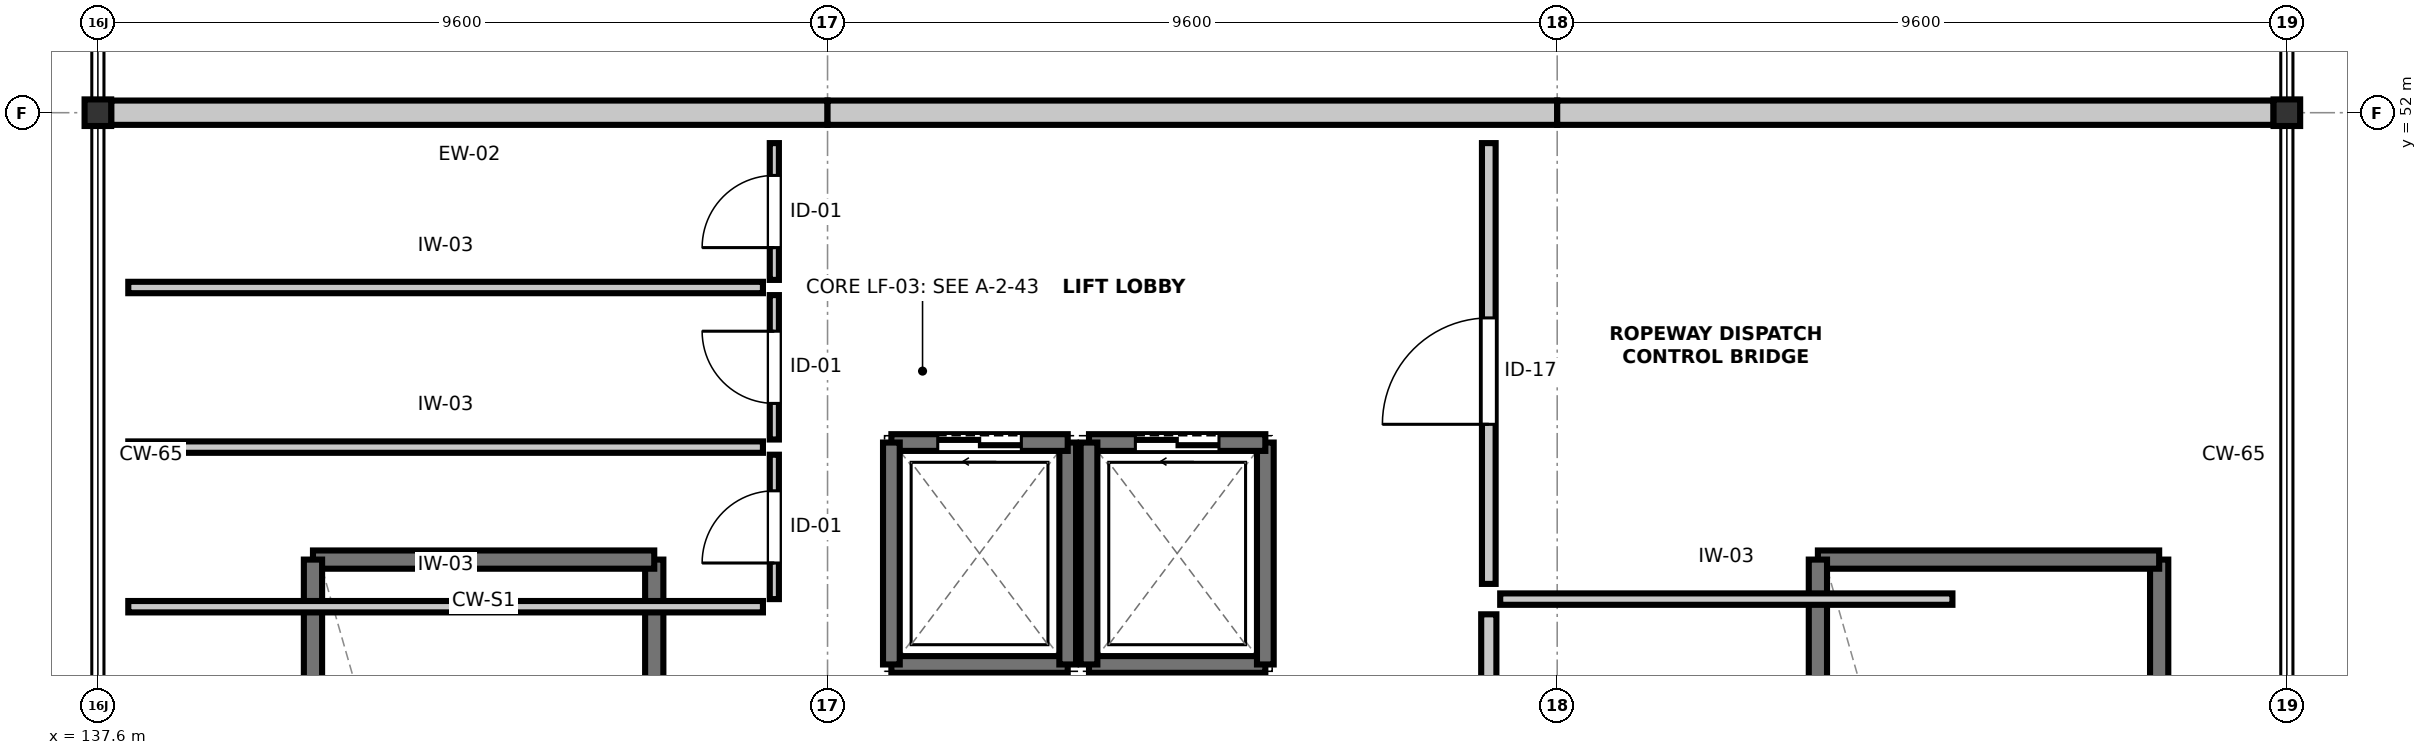
"""IFC4 building model, lengths in metres.
Left out: names, types, materials, properties, quantities, classifications, styles, units other than length and angle.
Written with IfcOpenShell. Run it as: python <this file> out.ifc"""

import sys

from ifc_helpers import new_model, si_unit, direction, frame, frame_2d, origin, origin_2d, place, context, subcontext, project, spatial, rectangle, i_section, extrude, element, fill, save


model = new_model("IFC4")
c1 = context("Model", 3, precision=1e-05, world=origin(), true_north=direction((0.0, 1.0)))
c2 = subcontext(c1, "Body", "Model", "MODEL_VIEW")
j1 = project(units=[si_unit("LENGTHUNIT", "METRE"), si_unit("PLANEANGLEUNIT", "RADIAN")], contexts=[c1])
p1 = place(None, origin())
s1 = spatial("IfcSite", under=j1, at=p1, CompositionType="ELEMENT")
p2 = place(p1, origin())
s2 = spatial("IfcBuilding", under=s1, at=p2, CompositionType="ELEMENT")
p3 = place(p2, frame((0.0, 0.0, 24.6)))
s3 = spatial("IfcBuildingStorey", under=s2, at=p3, CompositionType="ELEMENT", Elevation=24.6)
for number, where, z_axis, x_axis in (
    (1, (137.6, 52.0, 0.0), (0.0, 0.0, 1.0), (1.0, 0.0, 0.0)),
    (2, (166.4, 52.0, 0.0), (0.0, 0.0, 1.0), (1.0, 0.0, 0.0)),
):
    element("IfcColumn", number, at=place(p3, frame(where, z_axis=z_axis, x_axis=x_axis)), inside=s3, PredefinedType="COLUMN", context=c2, shape_type="SweptSolid", body=[
        extrude(i_section(OverallWidth=0.35, OverallDepth=0.35, WebThickness=0.012, FlangeThickness=0.019, FilletRadius=0.02, at=origin_2d()), origin(), (0.0, 0.0, 1.0), 3.282),
    ])
p4 = place(p3, frame((147.2, 52.0, 0.0), z_axis=(0.0, 0.0, 1.0), x_axis=(-1.0, 0.0, 0.0)))
e3 = element("IfcWall", 3, at=p4, inside=s3, PredefinedType="STANDARD", context=c2, shape_type="SweptSolid", body=[
    extrude(rectangle(XDim=9.425, YDim=0.32, at=frame_2d((4.712, 0.0))), origin(), (0.0, 0.0, 1.0), 2.35),
])
p5 = place(p3, frame((156.8, 52.0, 0.0), z_axis=(0.0, 0.0, 1.0), x_axis=(-1.0, 0.0, 0.0)))
e4 = element("IfcWall", 4, at=p5, inside=s3, PredefinedType="STANDARD", context=c2, shape_type="SweptSolid", body=[
    extrude(rectangle(XDim=9.6, YDim=0.32, at=frame_2d((4.8, 0.0))), origin(), (0.0, 0.0, 1.0), 2.35),
])
p6 = place(p3, frame((166.225, 52.0, 0.0), z_axis=(0.0, 0.0, 1.0), x_axis=(-1.0, 0.0, 0.0)))
e5 = element("IfcWall", 5, at=p6, inside=s3, PredefinedType="STANDARD", context=c2, shape_type="SweptSolid", body=[
    extrude(rectangle(XDim=9.425, YDim=0.32, at=frame_2d((4.712, 0.0))), origin(), (0.0, 0.0, 1.0), 2.35),
])
p7 = place(p3, frame((144.92, 36.68, 0.0), z_axis=(0.0, 0.0, 1.0), x_axis=(0.0, 1.0, 0.0)))
e6 = element("IfcWall", 6, at=p7, inside=s3, PredefinedType="SHEAR", context=c2, shape_type="SweptSolid", body=[
    extrude(rectangle(XDim=9.44, YDim=0.24, at=frame_2d((4.72, 0.0))), origin(), (0.0, 0.0, 1.0), 2.35),
])
p8 = place(p3, frame((144.92, 46.12, 0.0), z_axis=(0.0, 0.0, 1.0), x_axis=(-1.0, 0.0, 0.0)))
e7 = element("IfcWall", 7, at=p8, inside=s3, PredefinedType="SHEAR", context=c2, shape_type="SweptSolid", body=[
    extrude(rectangle(XDim=4.49, YDim=0.24, at=frame_2d((2.245, 0.0))), origin(), (0.0, 0.0, 1.0), 2.35),
])
for number, where, z_axis, x_axis in (
    (8, (140.43, 46.12, 0.0), (0.0, 0.0, 1.0), (0.0, -1.0, 0.0)),
    (9, (164.72, 36.68, 0.0), (0.0, 0.0, 1.0), (0.0, 1.0, 0.0)),
):
    element("IfcWall", number, at=place(p3, frame(where, z_axis=z_axis, x_axis=x_axis)), inside=s3, PredefinedType="SHEAR", context=c2, shape_type="SweptSolid", body=[
        extrude(rectangle(XDim=9.44, YDim=0.24, at=frame_2d((4.72, 0.0))), origin(), (0.0, 0.0, 1.0), 2.35),
    ])
p9 = place(p3, frame((164.72, 46.12, 0.0), z_axis=(0.0, 0.0, 1.0), x_axis=(-1.0, 0.0, 0.0)))
e10 = element("IfcWall", 10, at=p9, inside=s3, PredefinedType="SHEAR", context=c2, shape_type="SweptSolid", body=[
    extrude(rectangle(XDim=4.49, YDim=0.24, at=frame_2d((2.245, 0.0))), origin(), (0.0, 0.0, 1.0), 2.35),
])
p10 = place(p3, frame((160.23, 46.12, 0.0), z_axis=(0.0, 0.0, 1.0), x_axis=(0.0, -1.0, 0.0)))
e11 = element("IfcWall", 11, at=p10, inside=s3, PredefinedType="SHEAR", context=c2, shape_type="SweptSolid", body=[
    extrude(rectangle(XDim=9.44, YDim=0.24, at=frame_2d((4.72, 0.0))), origin(), (0.0, 0.0, 1.0), 2.35),
])
p11 = place(p3, frame((148.04, 44.74, 0.0), z_axis=(0.0, 0.0, 1.0), x_axis=(1.0, 0.0, 0.0)))
e12 = element("IfcWall", 12, at=p11, inside=s3, PredefinedType="SHEAR", context=c2, shape_type="SweptSolid", body=[
    extrude(rectangle(XDim=2.32, YDim=0.22, at=frame_2d((1.16, 0.0))), origin(), (0.0, 0.0, 1.0), 4.3),
])
p12 = place(p3, frame((150.36, 44.74, 0.0), z_axis=(0.0, 0.0, 1.0), x_axis=(0.0, 1.0, 0.0)))
e13 = element("IfcWall", 13, at=p12, inside=s3, PredefinedType="SHEAR", context=c2, shape_type="SweptSolid", body=[
    extrude(rectangle(XDim=2.92, YDim=0.22, at=frame_2d((1.46, 0.0))), origin(), (0.0, 0.0, 1.0), 4.3),
])
p13 = place(p3, frame((150.36, 47.66, 0.0), z_axis=(0.0, 0.0, 1.0), x_axis=(-1.0, 0.0, 0.0)))
e14 = element("IfcWall", 14, at=p13, inside=s3, PredefinedType="SHEAR", context=c2, shape_type="SweptSolid", body=[
    extrude(rectangle(XDim=2.32, YDim=0.22, at=frame_2d((1.16, 0.0))), origin(), (0.0, 0.0, 1.0), 4.3),
])
p14 = place(p13, frame((0.61, 0.0, 0.0)))
e15 = element("IfcOpeningElement", 15, at=p14, cuts=e14, PredefinedType="OPENING", context=c2, shape_type="SweptSolid", body=[
    extrude(rectangle(XDim=1.1, YDim=2.15, at=frame_2d((0.55, 1.075))), frame((0.0, 0.12, 0.0), z_axis=(0.0, -1.0, 0.0), x_axis=(1.0, 0.0, 0.0)), (0.0, 0.0, 1.0), 0.24),
])
p15 = place(p3, frame((148.04, 47.66, 0.0), z_axis=(0.0, 0.0, 1.0), x_axis=(0.0, -1.0, 0.0)))
e16 = element("IfcWall", 16, at=p15, inside=s3, PredefinedType="SHEAR", context=c2, shape_type="SweptSolid", body=[
    extrude(rectangle(XDim=2.92, YDim=0.22, at=frame_2d((1.46, 0.0))), origin(), (0.0, 0.0, 1.0), 4.3),
])
p16 = place(p3, frame((150.64, 44.74, 0.0), z_axis=(0.0, 0.0, 1.0), x_axis=(1.0, 0.0, 0.0)))
e17 = element("IfcWall", 17, at=p16, inside=s3, PredefinedType="SHEAR", context=c2, shape_type="SweptSolid", body=[
    extrude(rectangle(XDim=2.32, YDim=0.22, at=frame_2d((1.16, 0.0))), origin(), (0.0, 0.0, 1.0), 4.3),
])
p17 = place(p3, frame((152.96, 44.74, 0.0), z_axis=(0.0, 0.0, 1.0), x_axis=(0.0, 1.0, 0.0)))
e18 = element("IfcWall", 18, at=p17, inside=s3, PredefinedType="SHEAR", context=c2, shape_type="SweptSolid", body=[
    extrude(rectangle(XDim=2.92, YDim=0.22, at=frame_2d((1.46, 0.0))), origin(), (0.0, 0.0, 1.0), 4.3),
])
p18 = place(p3, frame((152.96, 47.66, 0.0), z_axis=(0.0, 0.0, 1.0), x_axis=(-1.0, 0.0, 0.0)))
e19 = element("IfcWall", 19, at=p18, inside=s3, PredefinedType="SHEAR", context=c2, shape_type="SweptSolid", body=[
    extrude(rectangle(XDim=2.32, YDim=0.22, at=frame_2d((1.16, 0.0))), origin(), (0.0, 0.0, 1.0), 4.3),
])
p19 = place(p18, frame((0.61, 0.0, 0.0)))
e20 = element("IfcOpeningElement", 20, at=p19, cuts=e19, PredefinedType="OPENING", context=c2, shape_type="SweptSolid", body=[
    extrude(rectangle(XDim=1.1, YDim=2.15, at=frame_2d((0.55, 1.075))), frame((0.0, 0.12, 0.0), z_axis=(0.0, -1.0, 0.0), x_axis=(1.0, 0.0, 0.0)), (0.0, 0.0, 1.0), 0.24),
])
p20 = place(p3, frame((150.64, 47.66, 0.0), z_axis=(0.0, 0.0, 1.0), x_axis=(0.0, -1.0, 0.0)))
e21 = element("IfcWall", 21, at=p20, inside=s3, PredefinedType="SHEAR", context=c2, shape_type="SweptSolid", body=[
    extrude(rectangle(XDim=2.92, YDim=0.22, at=frame_2d((1.46, 0.0))), origin(), (0.0, 0.0, 1.0), 4.3),
])
p21 = place(p3, frame((155.9, 45.8, 0.0), z_axis=(0.0, 0.0, 1.0), x_axis=(0.0, 1.0, 0.0)))
e22 = element("IfcWall", 22, at=p21, inside=s3, PredefinedType="PARTITIONING", context=c2, shape_type="SweptSolid", body=[
    extrude(rectangle(XDim=5.8, YDim=0.18, at=frame_2d((2.9, 0.0))), origin(), (0.0, 0.0, 1.0), 4.0),
])
p22 = place(p21, frame((2.1, 0.0, 0.0)))
e23 = element("IfcOpeningElement", 23, at=p22, cuts=e22, PredefinedType="OPENING", context=c2, shape_type="SweptSolid", body=[
    extrude(rectangle(XDim=1.4, YDim=2.22, at=frame_2d((0.7, 1.11))), frame((0.0, 0.1, 0.0), z_axis=(0.0, -1.0, 0.0), x_axis=(1.0, 0.0, 0.0)), (0.0, 0.0, 1.0), 0.2),
])
p23 = place(p3, frame((155.9, 36.8, 0.0), z_axis=(0.0, 0.0, 1.0), x_axis=(0.0, 1.0, 0.0)))
e24 = element("IfcWall", 24, at=p23, inside=s3, PredefinedType="PARTITIONING", context=c2, shape_type="SweptSolid", body=[
    extrude(rectangle(XDim=8.6, YDim=0.2, at=frame_2d((4.3, 0.0))), origin(), (0.0, 0.0, 1.0), 4.0),
])
p24 = place(p23, frame((3.425, 0.0, 0.0)))
e25 = element("IfcOpeningElement", 25, at=p24, cuts=e24, PredefinedType="OPENING", context=c2, shape_type="SweptSolid", body=[
    extrude(rectangle(XDim=1.15, YDim=2.16, at=frame_2d((0.575, 1.08))), frame((0.0, 0.11, 0.0), z_axis=(0.0, -1.0, 0.0), x_axis=(1.0, 0.0, 0.0)), (0.0, 0.0, 1.0), 0.22),
])
p25 = place(p3, frame((156.05, 45.6, 0.0), z_axis=(0.0, 0.0, 1.0), x_axis=(1.0, 0.0, 0.0)))
e26 = element("IfcWall", 26, at=p25, inside=s3, PredefinedType="PARTITIONING", context=c2, shape_type="SweptSolid", body=[
    extrude(rectangle(XDim=5.95, YDim=0.15, at=frame_2d((2.975, 0.0))), origin(), (0.0, 0.0, 1.0), 4.0),
])
p26 = place(p3, frame((146.5, 45.6, 0.0), z_axis=(0.0, 0.0, 1.0), x_axis=(0.0, 1.0, 0.0)))
e27 = element("IfcWall", 27, at=p26, inside=s3, PredefinedType="PARTITIONING", context=c2, shape_type="SweptSolid", body=[
    extrude(rectangle(XDim=1.9, YDim=0.12, at=frame_2d((0.95, 0.0))), origin(), (0.0, 0.0, 1.0), 4.0),
])
p27 = place(p26, frame((0.475, 0.0, 0.0)))
e28 = element("IfcOpeningElement", 28, at=p27, cuts=e27, PredefinedType="OPENING", context=c2, shape_type="SweptSolid", body=[
    extrude(rectangle(XDim=0.95, YDim=2.12, at=frame_2d((0.475, 1.06))), frame((0.0, 0.07, 0.0), z_axis=(0.0, -1.0, 0.0), x_axis=(1.0, 0.0, 0.0)), (0.0, 0.0, 1.0), 0.14),
])
p28 = place(p3, frame((138.0, 45.5, 0.0), z_axis=(0.0, 0.0, 1.0), x_axis=(1.0, 0.0, 0.0)))
e29 = element("IfcWall", 29, at=p28, inside=s3, PredefinedType="PARTITIONING", context=c2, shape_type="SweptSolid", body=[
    extrude(rectangle(XDim=8.35, YDim=0.15, at=frame_2d((4.175, 0.0))), origin(), (0.0, 0.0, 1.0), 4.0),
])
p29 = place(p3, frame((146.5, 47.7, 0.0), z_axis=(0.0, 0.0, 1.0), x_axis=(0.0, 1.0, 0.0)))
e30 = element("IfcWall", 30, at=p29, inside=s3, PredefinedType="PARTITIONING", context=c2, shape_type="SweptSolid", body=[
    extrude(rectangle(XDim=1.9, YDim=0.12, at=frame_2d((0.95, 0.0))), origin(), (0.0, 0.0, 1.0), 4.0),
])
p30 = place(p29, frame((0.475, 0.0, 0.0)))
e31 = element("IfcOpeningElement", 31, at=p30, cuts=e30, PredefinedType="OPENING", context=c2, shape_type="SweptSolid", body=[
    extrude(rectangle(XDim=0.95, YDim=2.12, at=frame_2d((0.475, 1.06))), frame((0.0, 0.07, 0.0), z_axis=(0.0, -1.0, 0.0), x_axis=(1.0, 0.0, 0.0)), (0.0, 0.0, 1.0), 0.14),
])
p31 = place(p3, frame((138.0, 47.6, 0.0), z_axis=(0.0, 0.0, 1.0), x_axis=(1.0, 0.0, 0.0)))
e32 = element("IfcWall", 32, at=p31, inside=s3, PredefinedType="PARTITIONING", context=c2, shape_type="SweptSolid", body=[
    extrude(rectangle(XDim=8.35, YDim=0.15, at=frame_2d((4.175, 0.0))), origin(), (0.0, 0.0, 1.0), 4.0),
])
p32 = place(p3, frame((146.5, 49.8, 0.0), z_axis=(0.0, 0.0, 1.0), x_axis=(0.0, 1.0, 0.0)))
e33 = element("IfcWall", 33, at=p32, inside=s3, PredefinedType="PARTITIONING", context=c2, shape_type="SweptSolid", body=[
    extrude(rectangle(XDim=1.8, YDim=0.12, at=frame_2d((0.9, 0.0))), origin(), (0.0, 0.0, 1.0), 4.0),
])
p33 = place(p32, frame((0.425, 0.0, 0.0)))
e34 = element("IfcOpeningElement", 34, at=p33, cuts=e33, PredefinedType="OPENING", context=c2, shape_type="SweptSolid", body=[
    extrude(rectangle(XDim=0.95, YDim=2.12, at=frame_2d((0.475, 1.06))), frame((0.0, 0.07, 0.0), z_axis=(0.0, -1.0, 0.0), x_axis=(1.0, 0.0, 0.0)), (0.0, 0.0, 1.0), 0.14),
])
p34 = place(p3, frame((138.0, 49.7, 0.0), z_axis=(0.0, 0.0, 1.0), x_axis=(1.0, 0.0, 0.0)))
e35 = element("IfcWall", 35, at=p34, inside=s3, PredefinedType="PARTITIONING", context=c2, shape_type="SweptSolid", body=[
    extrude(rectangle(XDim=8.35, YDim=0.15, at=frame_2d((4.175, 0.0))), origin(), (0.0, 0.0, 1.0), 4.0),
])
p35 = place(p14, origin())
e36 = element("IfcDoor", 36, at=p35, inside=s3, OperationType="DOUBLE_DOOR_SLIDING", PredefinedType="DOOR", context=c2, shape_type="SweptSolid", body=[
    extrude(rectangle(XDim=1.1, YDim=2.15, at=frame_2d((0.55, 1.075))), frame((0.0, 0.025, 0.0), z_axis=(0.0, -1.0, 0.0), x_axis=(1.0, 0.0, 0.0)), (0.0, 0.0, 1.0), 0.05),
])
fill(e15, e36)
p36 = place(p19, origin())
e37 = element("IfcDoor", 37, at=p36, inside=s3, OperationType="DOUBLE_DOOR_SLIDING", PredefinedType="DOOR", context=c2, shape_type="SweptSolid", body=[
    extrude(rectangle(XDim=1.1, YDim=2.15, at=frame_2d((0.55, 1.075))), frame((0.0, 0.025, 0.0), z_axis=(0.0, -1.0, 0.0), x_axis=(1.0, 0.0, 0.0)), (0.0, 0.0, 1.0), 0.05),
])
fill(e20, e37)
p37 = place(p22, origin())
e38 = element("IfcDoor", 38, at=p37, inside=s3, OperationType="SINGLE_SWING_LEFT", PredefinedType="DOOR", context=c2, shape_type="SweptSolid", body=[
    extrude(rectangle(XDim=1.4, YDim=2.22, at=frame_2d((0.7, 1.11))), frame((0.0, 0.025, 0.0), z_axis=(0.0, -1.0, 0.0), x_axis=(1.0, 0.0, 0.0)), (0.0, 0.0, 1.0), 0.05),
])
fill(e23, e38)
p38 = place(p27, origin())
e39 = element("IfcDoor", 39, at=p38, inside=s3, OperationType="SINGLE_SWING_LEFT", PredefinedType="DOOR", context=c2, shape_type="SweptSolid", body=[
    extrude(rectangle(XDim=0.95, YDim=2.12, at=frame_2d((0.475, 1.06))), frame((0.0, 0.025, 0.0), z_axis=(0.0, -1.0, 0.0), x_axis=(1.0, 0.0, 0.0)), (0.0, 0.0, 1.0), 0.05),
])
fill(e28, e39)
p39 = place(p30, origin())
e40 = element("IfcDoor", 40, at=p39, inside=s3, OperationType="SINGLE_SWING_RIGHT", PredefinedType="DOOR", context=c2, shape_type="SweptSolid", body=[
    extrude(rectangle(XDim=0.95, YDim=2.12, at=frame_2d((0.475, 1.06))), frame((0.0, 0.025, 0.0), z_axis=(0.0, -1.0, 0.0), x_axis=(1.0, 0.0, 0.0)), (0.0, 0.0, 1.0), 0.05),
])
fill(e31, e40)
p40 = place(p33, origin())
e41 = element("IfcDoor", 41, at=p40, inside=s3, OperationType="SINGLE_SWING_LEFT", PredefinedType="DOOR", context=c2, shape_type="SweptSolid", body=[
    extrude(rectangle(XDim=0.95, YDim=2.12, at=frame_2d((0.475, 1.06))), frame((0.0, 0.025, 0.0), z_axis=(0.0, -1.0, 0.0), x_axis=(1.0, 0.0, 0.0)), (0.0, 0.0, 1.0), 0.05),
])
fill(e34, e41)
save(model, sys.argv[1])
